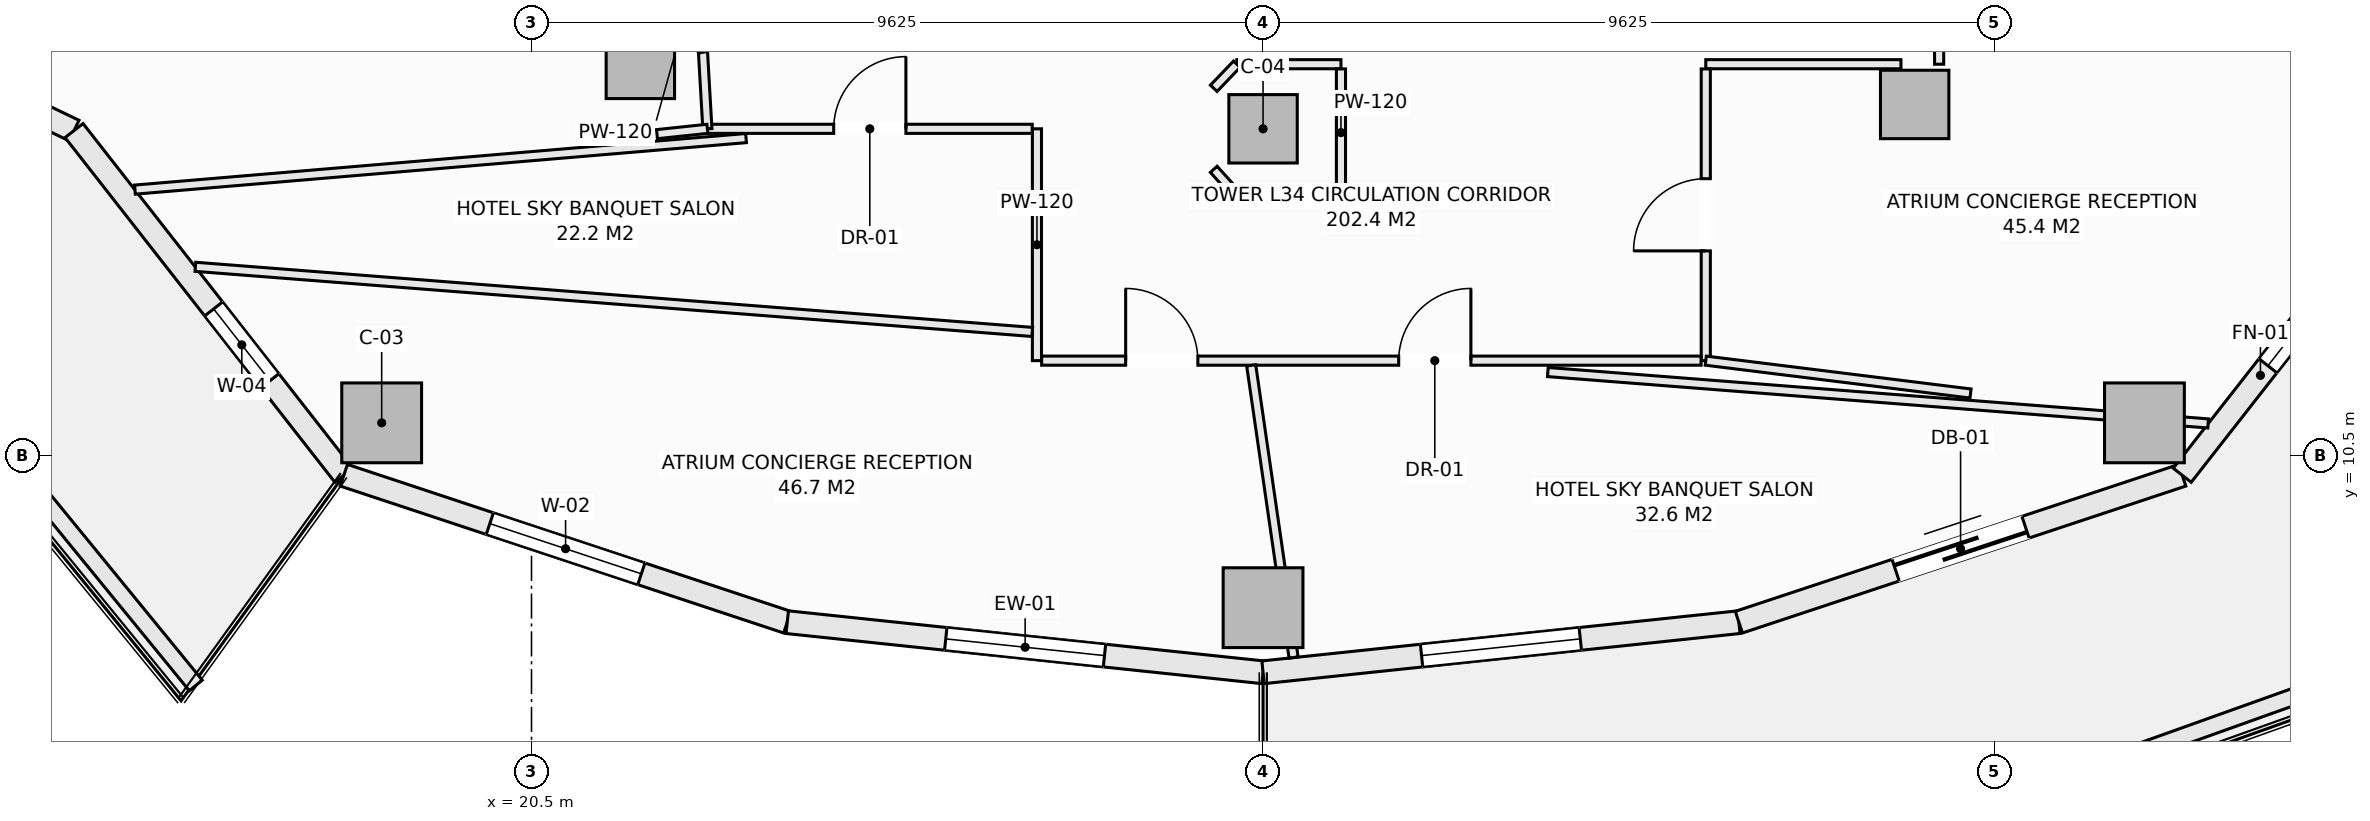
"""IFC4 building model, lengths in metres.
Left out: names, types, materials, properties, quantities, classifications, styles, units other than length and angle.
Written with IfcOpenShell. Run it as: python <this file> out.ifc"""

import sys

from ifc_helpers import new_model, si_unit, direction, frame, frame_2d, origin, origin_2d, place, context, subcontext, project, spatial, rectangle, extrude, element, fill, save


model = new_model("IFC4")
c1 = context("Model", 3, precision=1e-05, world=origin(), true_north=direction((0.0, 1.0)))
c2 = subcontext(c1, "Body", "Model", "MODEL_VIEW")
j1 = project(units=[si_unit("LENGTHUNIT", "METRE"), si_unit("PLANEANGLEUNIT", "RADIAN")], contexts=[c1])
p1 = place(None, origin())
s1 = spatial("IfcSite", under=j1, at=p1, CompositionType="ELEMENT")
p2 = place(p1, origin())
s2 = spatial("IfcBuilding", under=s1, at=p2, CompositionType="ELEMENT")
p3 = place(p2, frame((0.0, 0.0, 135.9)))
s3 = spatial("IfcBuildingStorey", under=s2, at=p3, CompositionType="ELEMENT", Elevation=135.9)
for number, where, z_axis, x_axis in (
    (1, (18.529, 10.932, -0.27), (0.0, 0.0, 1.0), (1.0, 0.0, 0.0)),
    (2, (30.125, 8.5, -0.27), (0.0, 0.0, 1.0), (1.0, 0.0, 0.0)),
    (3, (41.721, 10.932, -0.27), (0.0, 0.0, 1.0), (1.0, 0.0, 0.0)),
):
    element("IfcColumn", number, at=place(p3, frame(where, z_axis=z_axis, x_axis=x_axis)), inside=s3, PredefinedType="COLUMN", context=c2, shape_type="SweptSolid", body=[
        extrude(rectangle(XDim=1.05, YDim=1.05, at=origin_2d()), origin(), (0.0, 0.0, 1.0), 3.4),
    ])
for number, where, z_axis, x_axis in (
    (4, (21.932, 15.648, -0.27), (0.0, 0.0, 1.0), (1.0, 0.0, 0.0)),
    (5, (30.125, 14.8, -0.27), (0.0, 0.0, 1.0), (1.0, 0.0, 0.0)),
    (6, (38.698, 15.121, -0.27), (0.0, 0.0, 1.0), (1.0, 0.0, 0.0)),
):
    element("IfcColumn", number, at=place(p3, frame(where, z_axis=z_axis, x_axis=x_axis)), inside=s3, PredefinedType="COLUMN", context=c2, shape_type="SweptSolid", body=[
        extrude(rectangle(XDim=0.9, YDim=0.9, at=origin_2d()), origin(), (0.0, 0.0, 1.0), 3.4),
    ])
p4 = place(p3, frame((9.178, 17.325, 0.0), z_axis=(0.0, 0.0, 1.0), x_axis=(0.901370184739, -0.433049408339, 0.0)))
e7 = element("IfcWall", 7, at=p4, inside=s3, PredefinedType="SOLIDWALL", context=c2, shape_type="SweptSolid", body=[
    extrude(rectangle(XDim=5.884, YDim=0.3, at=frame_2d((2.942, 0.0))), origin(), (0.0, 0.0, 1.0), 2.653),
])
p5 = place(p4, frame((2.042, 0.0, 0.0)))
e8 = element("IfcOpeningElement", 8, at=p5, cuts=e7, PredefinedType="OPENING", context=c2, shape_type="SweptSolid", body=[
    extrude(rectangle(XDim=1.8, YDim=2.25, at=frame_2d((0.9, 1.125))), frame((0.0, 0.16, 0.0), z_axis=(0.0, -1.0, 0.0), x_axis=(1.0, 0.0, 0.0)), (0.0, 0.0, 1.0), 0.32),
])
p6 = place(p3, frame((14.481, 14.777, 0.0), z_axis=(0.0, 0.0, 1.0), x_axis=(0.616435134162, -0.787405693001, 0.0)))
e9 = element("IfcWall", 9, at=p6, inside=s3, PredefinedType="SOLIDWALL", context=c2, shape_type="SweptSolid", body=[
    extrude(rectangle(XDim=5.759, YDim=0.3, at=frame_2d((2.879, 0.0))), origin(), (0.0, 0.0, 1.0), 2.653),
])
p7 = place(p6, frame((2.98, 0.0, 0.72)))
e10 = element("IfcOpeningElement", 10, at=p7, cuts=e9, PredefinedType="OPENING", context=c2, shape_type="SweptSolid", body=[
    extrude(rectangle(XDim=1.2, YDim=1.65, at=frame_2d((0.6, 0.825))), frame((0.0, 0.16, 0.0), z_axis=(0.0, -1.0, 0.0), x_axis=(1.0, 0.0, 0.0)), (0.0, 0.0, 1.0), 0.32),
])
p8 = place(p3, frame((18.031, 10.242, 0.0), z_axis=(0.0, 0.0, 1.0), x_axis=(0.949238009374, -0.314558741032, 0.0)))
e11 = element("IfcWall", 11, at=p8, inside=s3, PredefinedType="SOLIDWALL", context=c2, shape_type="SweptSolid", body=[
    extrude(rectangle(XDim=6.146, YDim=0.3, at=frame_2d((3.073, 0.0))), origin(), (0.0, 0.0, 1.0), 2.653),
])
p9 = place(p8, frame((2.023, 0.0, 0.74)))
e12 = element("IfcOpeningElement", 12, at=p9, cuts=e11, PredefinedType="OPENING", context=c2, shape_type="SweptSolid", body=[
    extrude(rectangle(XDim=2.1, YDim=1.7, at=frame_2d((1.05, 0.85))), frame((0.0, 0.16, 0.0), z_axis=(0.0, -1.0, 0.0), x_axis=(1.0, 0.0, 0.0)), (0.0, 0.0, 1.0), 0.32),
])
p10 = place(p3, frame((23.865, 8.309, 0.0), z_axis=(0.0, 0.0, 1.0), x_axis=(0.994498012394, -0.104755445421, 0.0)))
e13 = element("IfcWall", 13, at=p10, inside=s3, PredefinedType="SOLIDWALL", context=c2, shape_type="SweptSolid", body=[
    extrude(rectangle(XDim=6.295, YDim=0.3, at=frame_2d((3.147, 0.0))), origin(), (0.0, 0.0, 1.0), 2.653),
])
p11 = place(p10, frame((2.097, 0.0, 0.74)))
e14 = element("IfcOpeningElement", 14, at=p11, cuts=e13, PredefinedType="OPENING", context=c2, shape_type="SweptSolid", body=[
    extrude(rectangle(XDim=2.1, YDim=1.7, at=frame_2d((1.05, 0.85))), frame((0.0, 0.16, 0.0), z_axis=(0.0, -1.0, 0.0), x_axis=(1.0, 0.0, 0.0)), (0.0, 0.0, 1.0), 0.32),
])
p12 = place(p3, frame((30.125, 7.65, 0.0), z_axis=(0.0, 0.0, 1.0), x_axis=(0.994498012394, 0.104755445421, 0.0)))
e15 = element("IfcWall", 15, at=p12, inside=s3, PredefinedType="SOLIDWALL", context=c2, shape_type="SweptSolid", body=[
    extrude(rectangle(XDim=6.295, YDim=0.3, at=frame_2d((3.147, 0.0))), origin(), (0.0, 0.0, 1.0), 2.653),
])
p13 = place(p12, frame((2.097, 0.0, 0.74)))
e16 = element("IfcOpeningElement", 16, at=p13, cuts=e15, PredefinedType="OPENING", context=c2, shape_type="SweptSolid", body=[
    extrude(rectangle(XDim=2.1, YDim=1.7, at=frame_2d((1.05, 0.85))), frame((0.0, 0.16, 0.0), z_axis=(0.0, -1.0, 0.0), x_axis=(1.0, 0.0, 0.0)), (0.0, 0.0, 1.0), 0.32),
])
p14 = place(p3, frame((36.385, 8.309, 0.0), z_axis=(0.0, 0.0, 1.0), x_axis=(0.949238009374, 0.314558741032, 0.0)))
e17 = element("IfcWall", 17, at=p14, inside=s3, PredefinedType="SOLIDWALL", context=c2, shape_type="SweptSolid", body=[
    extrude(rectangle(XDim=6.146, YDim=0.3, at=frame_2d((3.073, 0.0))), origin(), (0.0, 0.0, 1.0), 2.653),
])
p15 = place(p14, frame((2.173, 0.0, 0.0)))
e18 = element("IfcOpeningElement", 18, at=p15, cuts=e17, PredefinedType="OPENING", context=c2, shape_type="SweptSolid", body=[
    extrude(rectangle(XDim=1.8, YDim=2.25, at=frame_2d((0.9, 1.125))), frame((0.0, 0.16, 0.0), z_axis=(0.0, -1.0, 0.0), x_axis=(1.0, 0.0, 0.0)), (0.0, 0.0, 1.0), 0.32),
])
p16 = place(p3, frame((42.219, 10.242, 0.0), z_axis=(0.0, 0.0, 1.0), x_axis=(0.616435134162, 0.787405693001, 0.0)))
e19 = element("IfcWall", 19, at=p16, inside=s3, PredefinedType="SOLIDWALL", context=c2, shape_type="SweptSolid", body=[
    extrude(rectangle(XDim=5.759, YDim=0.3, at=frame_2d((2.879, 0.0))), origin(), (0.0, 0.0, 1.0), 2.653),
])
p17 = place(p16, frame((1.829, 0.0, 0.74)))
e20 = element("IfcOpeningElement", 20, at=p17, cuts=e19, PredefinedType="OPENING", context=c2, shape_type="SweptSolid", body=[
    extrude(rectangle(XDim=2.1, YDim=1.7, at=frame_2d((1.05, 0.85))), frame((0.0, 0.16, 0.0), z_axis=(0.0, -1.0, 0.0), x_axis=(1.0, 0.0, 0.0)), (0.0, 0.0, 1.0), 0.32),
])
p18 = place(p3, frame((11.791, 12.726, 0.0), z_axis=(0.0, 0.0, 1.0), x_axis=(0.633002467947, -0.77414977593, 0.0)))
e21 = element("IfcWall", 21, at=p18, inside=s3, PredefinedType="PARAPET", context=c2, shape_type="SweptSolid", body=[
    extrude(rectangle(XDim=6.78, YDim=0.22, at=frame_2d((3.39, 0.0))), origin(), (0.0, 0.0, 1.0), 0.52),
])
p19 = place(p3, frame((37.419, 5.087, 0.0), z_axis=(0.0, 0.0, 1.0), x_axis=(0.941632697311, 0.336642040387, 0.0)))
e22 = element("IfcWall", 22, at=p19, inside=s3, PredefinedType="PARAPET", context=c2, shape_type="SweptSolid", body=[
    extrude(rectangle(XDim=7.236, YDim=0.22, at=frame_2d((3.618, 0.0))), origin(), (0.0, 0.0, 1.0), 0.52),
])
p20 = place(p3, frame((27.15, 11.75, 0.0), z_axis=(0.0, 0.0, 1.0), x_axis=(0.0, 1.0, 0.0)))
e23 = element("IfcWall", 23, at=p20, inside=s3, PredefinedType="PARTITIONING", context=c2, shape_type="SweptSolid", body=[
    extrude(rectangle(XDim=3.05, YDim=0.12, at=frame_2d((1.525, 0.0))), origin(), (0.0, 0.0, 1.0), 3.13),
])
p21 = place(p3, frame((39.02, 15.65, 0.0), z_axis=(0.0, 0.0, 1.0), x_axis=(0.0, 1.0, 0.0)))
e24 = element("IfcWall", 24, at=p21, inside=s3, PredefinedType="PARTITIONING", context=c2, shape_type="SweptSolid", body=[
    extrude(rectangle(XDim=1.36, YDim=0.12, at=frame_2d((0.68, 0.0))), origin(), (0.0, 0.0, 1.0), 2.505),
])
p22 = place(p3, frame((29.78, 15.65, 0.0), z_axis=(0.0, 0.0, 1.0), x_axis=(1.0, 0.0, 0.0)))
e25 = element("IfcWall", 25, at=p22, inside=s3, PredefinedType="PARTITIONING", context=c2, shape_type="SweptSolid", body=[
    extrude(rectangle(XDim=1.37, YDim=0.12, at=frame_2d((0.685, 0.0))), origin(), (0.0, 0.0, 1.0), 3.13),
])
p23 = place(p3, frame((35.95, 15.65, 0.0), z_axis=(0.0, 0.0, 1.0), x_axis=(1.0, 0.0, 0.0)))
e26 = element("IfcWall", 26, at=p23, inside=s3, PredefinedType="PARTITIONING", context=c2, shape_type="SweptSolid", body=[
    extrude(rectangle(XDim=2.568, YDim=0.12, at=frame_2d((1.284, 0.0))), origin(), (0.0, 0.0, 1.0), 3.13),
])
p24 = place(p3, frame((35.95, 11.75, 0.0), z_axis=(0.0, 0.0, 1.0), x_axis=(0.0, 1.0, 0.0)))
e27 = element("IfcWall", 27, at=p24, inside=s3, PredefinedType="PARTITIONING", context=c2, shape_type="SweptSolid", body=[
    extrude(rectangle(XDim=3.838, YDim=0.12, at=frame_2d((1.919, 0.0))), origin(), (0.0, 0.0, 1.0), 3.13),
])
p25 = place(p24, frame((1.444, 0.0, 0.0)))
e28 = element("IfcOpeningElement", 28, at=p25, cuts=e27, PredefinedType="OPENING", context=c2, shape_type="SweptSolid", body=[
    extrude(rectangle(XDim=0.95, YDim=2.1, at=frame_2d((0.475, 1.05))), frame((0.0, 0.07, 0.0), z_axis=(0.0, -1.0, 0.0), x_axis=(1.0, 0.0, 0.0)), (0.0, 0.0, 1.0), 0.14),
])
p26 = place(p3, frame((27.212, 11.75, 0.0), z_axis=(0.0, 0.0, 1.0), x_axis=(1.0, 0.0, 0.0)))
e29 = element("IfcWall", 29, at=p26, inside=s3, PredefinedType="PARTITIONING", context=c2, shape_type="SweptSolid", body=[
    extrude(rectangle(XDim=8.676, YDim=0.12, at=frame_2d((4.338, 0.0))), origin(), (0.0, 0.0, 1.0), 3.13),
])
p27 = place(p26, frame((1.105, 0.0, 0.0)))
e30 = element("IfcOpeningElement", 30, at=p27, cuts=e29, PredefinedType="OPENING", context=c2, shape_type="SweptSolid", body=[
    extrude(rectangle(XDim=0.95, YDim=2.1, at=frame_2d((0.475, 1.05))), frame((0.0, 0.07, 0.0), z_axis=(0.0, -1.0, 0.0), x_axis=(1.0, 0.0, 0.0)), (0.0, 0.0, 1.0), 0.14),
])
p28 = place(p26, frame((4.698, 0.0, 0.0)))
e31 = element("IfcOpeningElement", 31, at=p28, cuts=e29, PredefinedType="OPENING", context=c2, shape_type="SweptSolid", body=[
    extrude(rectangle(XDim=0.95, YDim=2.1, at=frame_2d((0.475, 1.05))), frame((0.0, 0.07, 0.0), z_axis=(0.0, -1.0, 0.0), x_axis=(1.0, 0.0, 0.0)), (0.0, 0.0, 1.0), 0.14),
])
p29 = place(p3, frame((22.814, 14.8, 0.0), z_axis=(0.0, 0.0, 1.0), x_axis=(1.0, 0.0, 0.0)))
e32 = element("IfcWall", 32, at=p29, inside=s3, PredefinedType="PARTITIONING", context=c2, shape_type="SweptSolid", body=[
    extrude(rectangle(XDim=4.274, YDim=0.12, at=frame_2d((2.137, 0.0))), origin(), (0.0, 0.0, 1.0), 3.13),
])
p30 = place(p29, frame((1.662, 0.0, 0.0)))
e33 = element("IfcOpeningElement", 33, at=p30, cuts=e32, PredefinedType="OPENING", context=c2, shape_type="SweptSolid", body=[
    extrude(rectangle(XDim=0.95, YDim=2.1, at=frame_2d((0.475, 1.05))), frame((0.0, 0.07, 0.0), z_axis=(0.0, -1.0, 0.0), x_axis=(1.0, 0.0, 0.0)), (0.0, 0.0, 1.0), 0.14),
])
p31 = place(p3, frame((22.756, 15.811, 0.0), z_axis=(0.0, 0.0, 1.0), x_axis=(0.057139047697, -0.998366230012, 0.0)))
e34 = element("IfcWall", 34, at=p31, inside=s3, PredefinedType="PARTITIONING", context=c2, shape_type="SweptSolid", body=[
    extrude(rectangle(XDim=1.013, YDim=0.12, at=frame_2d((0.506, 0.0))), origin(), (0.0, 0.0, 1.0), 3.13),
])
p32 = place(p3, frame((22.353, 16.958, 0.0), z_axis=(0.0, 0.0, 1.0), x_axis=(0.331370038458, -0.943500873138, 0.0)))
e35 = element("IfcWall", 35, at=p32, inside=s3, PredefinedType="PARTITIONING", context=c2, shape_type="SweptSolid", body=[
    extrude(rectangle(XDim=1.216, YDim=0.12, at=frame_2d((0.608, 0.0))), origin(), (0.0, 0.0, 1.0), 3.13),
])
p33 = place(p3, frame((29.476, 15.333, 0.0), z_axis=(0.0, 0.0, 1.0), x_axis=(0.692219273951, 0.721687243043, 0.0)))
e36 = element("IfcWall", 36, at=p33, inside=s3, PredefinedType="PARTITIONING", context=c2, shape_type="SweptSolid", body=[
    extrude(rectangle(XDim=0.439, YDim=0.12, at=frame_2d((0.22, 0.0))), origin(), (0.0, 0.0, 1.0), 3.13),
])
p34 = place(p3, frame((29.476, 14.267, 0.0), z_axis=(0.0, 0.0, 1.0), x_axis=(0.670659392016, -0.741765448037, 0.0)))
e37 = element("IfcWall", 37, at=p34, inside=s3, PredefinedType="PARTITIONING", context=c2, shape_type="SweptSolid", body=[
    extrude(rectangle(XDim=0.453, YDim=0.12, at=frame_2d((0.227, 0.0))), origin(), (0.0, 0.0, 1.0), 3.13),
])
p35 = place(p3, frame((29.78, 13.85, 0.0), z_axis=(0.0, 0.0, 1.0), x_axis=(1.0, 0.0, 0.0)))
e38 = element("IfcWall", 38, at=p35, inside=s3, PredefinedType="PARTITIONING", context=c2, shape_type="SweptSolid", body=[
    extrude(rectangle(XDim=1.37, YDim=0.12, at=frame_2d((0.685, 0.0))), origin(), (0.0, 0.0, 1.0), 3.13),
])
p36 = place(p3, frame((31.15, 13.912, 0.0), z_axis=(0.0, 0.0, 1.0), x_axis=(0.0, 1.0, 0.0)))
e39 = element("IfcWall", 39, at=p36, inside=s3, PredefinedType="PARTITIONING", context=c2, shape_type="SweptSolid", body=[
    extrude(rectangle(XDim=1.676, YDim=0.12, at=frame_2d((0.838, 0.0))), origin(), (0.0, 0.0, 1.0), 3.13),
])
p37 = place(p3, frame((15.282, 14.0, 0.0), z_axis=(0.0, 0.0, 1.0), x_axis=(0.996466219822, 0.083994480498, 0.0)))
e40 = element("IfcWall", 40, at=p37, inside=s3, PredefinedType="PARTITIONING", context=c2, shape_type="SweptSolid", body=[
    extrude(rectangle(XDim=8.069, YDim=0.12, at=frame_2d((4.034, 0.0))), origin(), (0.0, 0.0, 1.0), 3.13),
])
p38 = place(p3, frame((16.078, 12.985, 0.0), z_axis=(0.0, 0.0, 1.0), x_axis=(0.996984897733, -0.077595835537, 0.0)))
e41 = element("IfcWall", 41, at=p38, inside=s3, PredefinedType="PARTITIONING", context=c2, shape_type="SweptSolid", body=[
    extrude(rectangle(XDim=11.043, YDim=0.12, at=frame_2d((5.522, 0.0))), origin(), (0.0, 0.0, 1.0), 2.653),
])
p39 = place(p3, frame((33.872, 11.6, 0.0), z_axis=(0.0, 0.0, 1.0), x_axis=(0.996986194661, -0.077579170241, 0.0)))
e42 = element("IfcWall", 42, at=p39, inside=s3, PredefinedType="PARTITIONING", context=c2, shape_type="SweptSolid", body=[
    extrude(rectangle(XDim=8.714, YDim=0.12, at=frame_2d((4.357, 0.0))), origin(), (0.0, 0.0, 1.0), 2.653),
])
p40 = place(p3, frame((29.969, 11.688, 0.0), z_axis=(0.0, 0.0, 1.0), x_axis=(0.143603994305, -0.989635232204, 0.0)))
e43 = element("IfcWall", 43, at=p40, inside=s3, PredefinedType="PARTITIONING", context=c2, shape_type="SweptSolid", body=[
    extrude(rectangle(XDim=3.883, YDim=0.12, at=frame_2d((1.941, 0.0))), origin(), (0.0, 0.0, 1.0), 2.812),
])
p41 = place(p3, frame((35.95, 11.75, 0.0), z_axis=(0.0, 0.0, 1.0), x_axis=(0.992393012253, -0.123110150805, 0.0)))
e44 = element("IfcWall", 44, at=p41, inside=s3, PredefinedType="PARTITIONING", context=c2, shape_type="SweptSolid", body=[
    extrude(rectangle(XDim=3.51, YDim=0.12, at=frame_2d((1.755, 0.0))), origin(), (0.0, 0.0, 1.0), 3.13),
])
p42 = place(p3, frame((22.151, 14.73, 0.0), z_axis=(0.0, 0.0, 1.0), x_axis=(0.994424911767, 0.105447118774, 0.0)))
e45 = element("IfcWall", 45, at=p42, inside=s3, PredefinedType="PARTITIONING", context=c2, shape_type="SweptSolid", body=[
    extrude(rectangle(XDim=0.667, YDim=0.12, at=frame_2d((0.333, 0.0))), origin(), (0.0, 0.0, 1.0), 3.13),
])
p43 = place(p7, origin())
e46 = element("IfcWindow", 46, at=p43, inside=s3, PartitioningType="SINGLE_PANEL", PredefinedType="WINDOW", context=c2, shape_type="SweptSolid", body=[
    extrude(rectangle(XDim=1.2, YDim=1.65, at=frame_2d((0.6, 0.825))), frame((0.0, 0.03, 0.0), z_axis=(0.0, -1.0, 0.0), x_axis=(1.0, 0.0, 0.0)), (0.0, 0.0, 1.0), 0.06),
])
fill(e10, e46)
p44 = place(p9, origin())
e47 = element("IfcWindow", 47, at=p44, inside=s3, PartitioningType="SINGLE_PANEL", PredefinedType="WINDOW", context=c2, shape_type="SweptSolid", body=[
    extrude(rectangle(XDim=2.1, YDim=1.7, at=frame_2d((1.05, 0.85))), frame((0.0, 0.03, 0.0), z_axis=(0.0, -1.0, 0.0), x_axis=(1.0, 0.0, 0.0)), (0.0, 0.0, 1.0), 0.06),
])
fill(e12, e47)
p45 = place(p11, origin())
e48 = element("IfcWindow", 48, at=p45, inside=s3, PartitioningType="SINGLE_PANEL", PredefinedType="WINDOW", context=c2, shape_type="SweptSolid", body=[
    extrude(rectangle(XDim=2.1, YDim=1.7, at=frame_2d((1.05, 0.85))), frame((0.0, 0.03, 0.0), z_axis=(0.0, -1.0, 0.0), x_axis=(1.0, 0.0, 0.0)), (0.0, 0.0, 1.0), 0.06),
])
fill(e14, e48)
p46 = place(p13, origin())
e49 = element("IfcWindow", 49, at=p46, inside=s3, PartitioningType="SINGLE_PANEL", PredefinedType="WINDOW", context=c2, shape_type="SweptSolid", body=[
    extrude(rectangle(XDim=2.1, YDim=1.7, at=frame_2d((1.05, 0.85))), frame((0.0, 0.03, 0.0), z_axis=(0.0, -1.0, 0.0), x_axis=(1.0, 0.0, 0.0)), (0.0, 0.0, 1.0), 0.06),
])
fill(e16, e49)
p47 = place(p15, frame((1.8, 0.0, 0.0), z_axis=(0.0, 0.0, 1.0), x_axis=(-1.0, 0.0, 0.0)))
e50 = element("IfcDoor", 50, at=p47, inside=s3, OperationType="SLIDING_TO_LEFT", PredefinedType="DOOR", context=c2, shape_type="SweptSolid", body=[
    extrude(rectangle(XDim=1.8, YDim=2.25, at=frame_2d((0.9, 1.125))), frame((0.0, 0.025, 0.0), z_axis=(0.0, -1.0, 0.0), x_axis=(1.0, 0.0, 0.0)), (0.0, 0.0, 1.0), 0.05),
])
fill(e18, e50)
p48 = place(p17, origin())
e51 = element("IfcWindow", 51, at=p48, inside=s3, PartitioningType="SINGLE_PANEL", PredefinedType="WINDOW", context=c2, shape_type="SweptSolid", body=[
    extrude(rectangle(XDim=2.1, YDim=1.7, at=frame_2d((1.05, 0.85))), frame((0.0, 0.03, 0.0), z_axis=(0.0, -1.0, 0.0), x_axis=(1.0, 0.0, 0.0)), (0.0, 0.0, 1.0), 0.06),
])
fill(e20, e51)
p49 = place(p30, origin())
e52 = element("IfcDoor", 52, at=p49, inside=s3, OperationType="SINGLE_SWING_RIGHT", PredefinedType="DOOR", context=c2, shape_type="SweptSolid", body=[
    extrude(rectangle(XDim=0.95, YDim=2.1, at=frame_2d((0.475, 1.05))), frame((0.0, 0.025, 0.0), z_axis=(0.0, -1.0, 0.0), x_axis=(1.0, 0.0, 0.0)), (0.0, 0.0, 1.0), 0.05),
])
fill(e33, e52)
p50 = place(p27, origin())
e53 = element("IfcDoor", 53, at=p50, inside=s3, OperationType="SINGLE_SWING_LEFT", PredefinedType="DOOR", context=c2, shape_type="SweptSolid", body=[
    extrude(rectangle(XDim=0.95, YDim=2.1, at=frame_2d((0.475, 1.05))), frame((0.0, 0.025, 0.0), z_axis=(0.0, -1.0, 0.0), x_axis=(1.0, 0.0, 0.0)), (0.0, 0.0, 1.0), 0.05),
])
fill(e30, e53)
p51 = place(p28, origin())
e54 = element("IfcDoor", 54, at=p51, inside=s3, OperationType="SINGLE_SWING_RIGHT", PredefinedType="DOOR", context=c2, shape_type="SweptSolid", body=[
    extrude(rectangle(XDim=0.95, YDim=2.1, at=frame_2d((0.475, 1.05))), frame((0.0, 0.025, 0.0), z_axis=(0.0, -1.0, 0.0), x_axis=(1.0, 0.0, 0.0)), (0.0, 0.0, 1.0), 0.05),
])
fill(e31, e54)
p52 = place(p25, origin())
e55 = element("IfcDoor", 55, at=p52, inside=s3, OperationType="SINGLE_SWING_LEFT", PredefinedType="DOOR", context=c2, shape_type="SweptSolid", body=[
    extrude(rectangle(XDim=0.95, YDim=2.1, at=frame_2d((0.475, 1.05))), frame((0.0, 0.025, 0.0), z_axis=(0.0, -1.0, 0.0), x_axis=(1.0, 0.0, 0.0)), (0.0, 0.0, 1.0), 0.05),
])
fill(e28, e55)
save(model, sys.argv[1])
